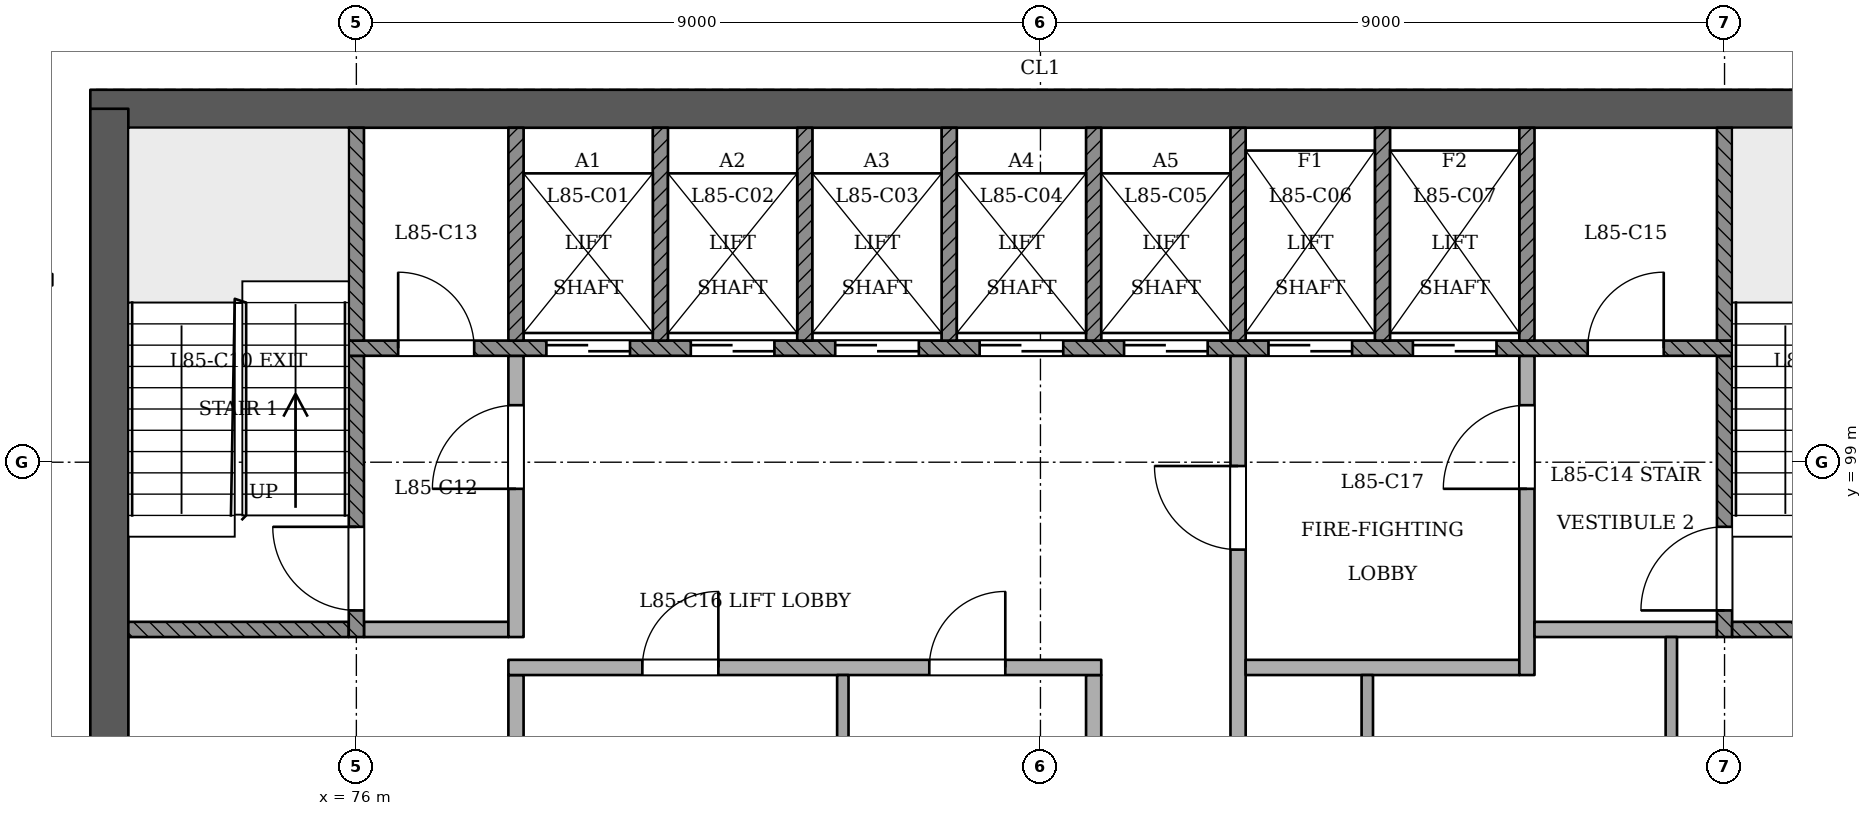
"""IFC4 building model, lengths in metres.
Left out: names, types, materials, properties, quantities, classifications, styles, units other than length and angle.
Written with IfcOpenShell. Run it as: python <this file> out.ifc"""

import sys

from ifc_helpers import new_model, si_unit, direction, frame, frame_2d, origin, place, context, subcontext, project, spatial, rectangle, extrude, element, fill, save


model = new_model("IFC4")
c1 = context("Model", 3, precision=1e-05, world=origin(), true_north=direction((0.0, 1.0)))
c2 = subcontext(c1, "Body", "Model", "MODEL_VIEW")
j1 = project(units=[si_unit("LENGTHUNIT", "METRE"), si_unit("PLANEANGLEUNIT", "RADIAN")], contexts=[c1])
p1 = place(None, origin())
s1 = spatial("IfcSite", under=j1, at=p1, CompositionType="ELEMENT")
p2 = place(p1, origin())
s2 = spatial("IfcBuilding", under=s1, at=p2, CompositionType="ELEMENT")
p3 = place(p2, frame((0.0, 0.0, 327.4)))
s3 = spatial("IfcBuildingStorey", under=s2, at=p3, CompositionType="ELEMENT", Elevation=327.4)
p4 = place(p3, frame((97.25, 103.65, 0.0), z_axis=(0.0, 0.0, 1.0), x_axis=(-1.0, 0.0, 0.0)))
e1 = element("IfcWall", 1, at=p4, inside=s3, PredefinedType="SHEAR", context=c2, shape_type="SweptSolid", body=[
    extrude(rectangle(XDim=24.75, YDim=0.5, at=frame_2d((12.375, 0.0))), origin(), (0.0, 0.0, 1.0), 3.6),
])
p5 = place(p3, frame((72.75, 103.65, 0.0), z_axis=(0.0, 0.0, 1.0), x_axis=(0.0, -1.0, 0.0)))
e2 = element("IfcWall", 2, at=p5, inside=s3, PredefinedType="SHEAR", context=c2, shape_type="SweptSolid", body=[
    extrude(rectangle(XDim=10.75, YDim=0.5, at=frame_2d((5.375, 0.0))), origin(), (0.0, 0.0, 1.0), 3.6),
])
p6 = place(p3, frame((78.1, 93.4, 0.0), z_axis=(0.0, 0.0, 1.0), x_axis=(0.0, 1.0, 0.0)))
e3 = element("IfcWall", 3, at=p6, inside=s3, PredefinedType="PARTITIONING", context=c2, shape_type="SweptSolid", body=[
    extrude(rectangle(XDim=2.8, YDim=0.2, at=frame_2d((1.4, 0.0))), origin(), (0.0, 0.0, 1.0), 3.2),
])
p7 = place(p3, frame((82.4, 93.4, 0.0), z_axis=(0.0, 0.0, 1.0), x_axis=(0.0, 1.0, 0.0)))
e4 = element("IfcWall", 4, at=p7, inside=s3, PredefinedType="PARTITIONING", context=c2, shape_type="SweptSolid", body=[
    extrude(rectangle(XDim=2.8, YDim=0.15, at=frame_2d((1.4, 0.0))), origin(), (0.0, 0.0, 1.0), 3.2),
])
p8 = place(p3, frame((85.7, 93.4, 0.0), z_axis=(0.0, 0.0, 1.0), x_axis=(0.0, 1.0, 0.0)))
e5 = element("IfcWall", 5, at=p8, inside=s3, PredefinedType="PARTITIONING", context=c2, shape_type="SweptSolid", body=[
    extrude(rectangle(XDim=2.8, YDim=0.2, at=frame_2d((1.4, 0.0))), origin(), (0.0, 0.0, 1.0), 3.2),
])
p9 = place(p3, frame((87.6, 93.4, 0.0), z_axis=(0.0, 0.0, 1.0), x_axis=(0.0, 1.0, 0.0)))
e6 = element("IfcWall", 6, at=p9, inside=s3, PredefinedType="PARTITIONING", context=c2, shape_type="SweptSolid", body=[
    extrude(rectangle(XDim=7.0, YDim=0.2, at=frame_2d((3.5, 0.0))), origin(), (0.0, 0.0, 1.0), 3.2),
])
p10 = place(p9, frame((4.45, 0.0, 0.0)))
e7 = element("IfcOpeningElement", 7, at=p10, cuts=e6, PredefinedType="OPENING", context=c2, shape_type="SweptSolid", body=[
    extrude(rectangle(XDim=1.1, YDim=2.1, at=frame_2d((0.55, 1.05))), frame((0.0, 0.11, 0.0), z_axis=(0.0, -1.0, 0.0), x_axis=(1.0, 0.0, 0.0)), (0.0, 0.0, 1.0), 0.221),
])
p11 = place(p3, frame((89.3, 93.4, 0.0), z_axis=(0.0, 0.0, 1.0), x_axis=(0.0, 1.0, 0.0)))
e8 = element("IfcWall", 8, at=p11, inside=s3, PredefinedType="PARTITIONING", context=c2, shape_type="SweptSolid", body=[
    extrude(rectangle(XDim=2.8, YDim=0.15, at=frame_2d((1.4, 0.0))), origin(), (0.0, 0.0, 1.0), 3.2),
])
p12 = place(p3, frame((93.3, 93.4, 0.0), z_axis=(0.0, 0.0, 1.0), x_axis=(0.0, 1.0, 0.0)))
e9 = element("IfcWall", 9, at=p12, inside=s3, PredefinedType="PARTITIONING", context=c2, shape_type="SweptSolid", body=[
    extrude(rectangle(XDim=3.3, YDim=0.15, at=frame_2d((1.65, 0.0))), origin(), (0.0, 0.0, 1.0), 3.2),
])
p13 = place(p3, frame((78.0, 96.3, 0.0), z_axis=(0.0, 0.0, 1.0), x_axis=(1.0, 0.0, 0.0)))
e10 = element("IfcWall", 10, at=p13, inside=s3, PredefinedType="PARTITIONING", context=c2, shape_type="SweptSolid", body=[
    extrude(rectangle(XDim=7.8, YDim=0.2, at=frame_2d((3.9, 0.0))), origin(), (0.0, 0.0, 1.0), 3.2),
])
p14 = place(p13, frame((1.762, 0.0, 0.0)))
e11 = element("IfcOpeningElement", 11, at=p14, cuts=e10, PredefinedType="OPENING", context=c2, shape_type="SweptSolid", body=[
    extrude(rectangle(XDim=1.0, YDim=2.1, at=frame_2d((0.5, 1.05))), frame((0.0, 0.11, 0.0), z_axis=(0.0, -1.0, 0.0), x_axis=(1.0, 0.0, 0.0)), (0.0, 0.0, 1.0), 0.221),
])
p15 = place(p13, frame((5.538, 0.0, 0.0)))
e12 = element("IfcOpeningElement", 12, at=p15, cuts=e10, PredefinedType="OPENING", context=c2, shape_type="SweptSolid", body=[
    extrude(rectangle(XDim=1.0, YDim=2.1, at=frame_2d((0.5, 1.05))), frame((0.0, 0.11, 0.0), z_axis=(0.0, -1.0, 0.0), x_axis=(1.0, 0.0, 0.0)), (0.0, 0.0, 1.0), 0.221),
])
p16 = place(p3, frame((87.7, 96.3, 0.0), z_axis=(0.0, 0.0, 1.0), x_axis=(1.0, 0.0, 0.0)))
e13 = element("IfcWall", 13, at=p16, inside=s3, PredefinedType="PARTITIONING", context=c2, shape_type="SweptSolid", body=[
    extrude(rectangle(XDim=3.6, YDim=0.2, at=frame_2d((1.8, 0.0))), origin(), (0.0, 0.0, 1.0), 3.2),
])
p17 = place(p3, frame((91.4, 96.2, 0.0), z_axis=(0.0, 0.0, 1.0), x_axis=(0.0, 1.0, 0.0)))
e14 = element("IfcWall", 14, at=p17, inside=s3, PredefinedType="PARTITIONING", context=c2, shape_type="SweptSolid", body=[
    extrude(rectangle(XDim=4.2, YDim=0.2, at=frame_2d((2.1, 0.0))), origin(), (0.0, 0.0, 1.0), 3.2),
])
p18 = place(p17, frame((2.45, 0.0, 0.0)))
e15 = element("IfcOpeningElement", 15, at=p18, cuts=e14, PredefinedType="OPENING", context=c2, shape_type="SweptSolid", body=[
    extrude(rectangle(XDim=1.1, YDim=2.1, at=frame_2d((0.55, 1.05))), frame((0.0, 0.11, 0.0), z_axis=(0.0, -1.0, 0.0), x_axis=(1.0, 0.0, 0.0)), (0.0, 0.0, 1.0), 0.221),
])
p19 = place(p3, frame((73.0, 96.8, 0.0), z_axis=(0.0, 0.0, 1.0), x_axis=(1.0, 0.0, 0.0)))
e16 = element("IfcWall", 16, at=p19, inside=s3, PredefinedType="SOLIDWALL", context=c2, shape_type="SweptSolid", body=[
    extrude(rectangle(XDim=2.9, YDim=0.2, at=frame_2d((1.45, 0.0))), origin(), (0.0, 0.0, 1.0), 3.2),
])
p20 = place(p3, frame((76.0, 96.7, 0.0), z_axis=(0.0, 0.0, 1.0), x_axis=(0.0, 1.0, 0.0)))
e17 = element("IfcWall", 17, at=p20, inside=s3, PredefinedType="SOLIDWALL", context=c2, shape_type="SweptSolid", body=[
    extrude(rectangle(XDim=3.7, YDim=0.2, at=frame_2d((1.85, 0.0))), origin(), (0.0, 0.0, 1.0), 3.2),
])
p21 = place(p20, frame((0.35, 0.0, 0.0)))
e18 = element("IfcOpeningElement", 18, at=p21, cuts=e17, PredefinedType="OPENING", context=c2, shape_type="SweptSolid", body=[
    extrude(rectangle(XDim=1.1, YDim=2.1, at=frame_2d((0.55, 1.05))), frame((0.0, 0.11, 0.0), z_axis=(0.0, -1.0, 0.0), x_axis=(1.0, 0.0, 0.0)), (0.0, 0.0, 1.0), 0.221),
])
p22 = place(p3, frame((76.1, 96.8, 0.0), z_axis=(0.0, 0.0, 1.0), x_axis=(1.0, 0.0, 0.0)))
e19 = element("IfcWall", 19, at=p22, inside=s3, PredefinedType="PARTITIONING", context=c2, shape_type="SweptSolid", body=[
    extrude(rectangle(XDim=1.9, YDim=0.2, at=frame_2d((0.95, 0.0))), origin(), (0.0, 0.0, 1.0), 3.2),
])
p23 = place(p3, frame((78.1, 96.7, 0.0), z_axis=(0.0, 0.0, 1.0), x_axis=(0.0, 1.0, 0.0)))
e20 = element("IfcWall", 20, at=p23, inside=s3, PredefinedType="PARTITIONING", context=c2, shape_type="SweptSolid", body=[
    extrude(rectangle(XDim=3.7, YDim=0.2, at=frame_2d((1.85, 0.0))), origin(), (0.0, 0.0, 1.0), 3.2),
])
p24 = place(p23, frame((1.95, 0.0, 0.0)))
e21 = element("IfcOpeningElement", 21, at=p24, cuts=e20, PredefinedType="OPENING", context=c2, shape_type="SweptSolid", body=[
    extrude(rectangle(XDim=1.1, YDim=2.1, at=frame_2d((0.55, 1.05))), frame((0.0, 0.11, 0.0), z_axis=(0.0, -1.0, 0.0), x_axis=(1.0, 0.0, 0.0)), (0.0, 0.0, 1.0), 0.221),
])
p25 = place(p3, frame((91.5, 96.8, 0.0), z_axis=(0.0, 0.0, 1.0), x_axis=(1.0, 0.0, 0.0)))
e22 = element("IfcWall", 22, at=p25, inside=s3, PredefinedType="PARTITIONING", context=c2, shape_type="SweptSolid", body=[
    extrude(rectangle(XDim=2.4, YDim=0.2, at=frame_2d((1.2, 0.0))), origin(), (0.0, 0.0, 1.0), 3.2),
])
p26 = place(p3, frame((94.0, 96.7, 0.0), z_axis=(0.0, 0.0, 1.0), x_axis=(0.0, 1.0, 0.0)))
e23 = element("IfcWall", 23, at=p26, inside=s3, PredefinedType="SOLIDWALL", context=c2, shape_type="SweptSolid", body=[
    extrude(rectangle(XDim=3.7, YDim=0.2, at=frame_2d((1.85, 0.0))), origin(), (0.0, 0.0, 1.0), 3.2),
])
p27 = place(p26, frame((0.35, 0.0, 0.0)))
e24 = element("IfcOpeningElement", 24, at=p27, cuts=e23, PredefinedType="OPENING", context=c2, shape_type="SweptSolid", body=[
    extrude(rectangle(XDim=1.1, YDim=2.1, at=frame_2d((0.55, 1.05))), frame((0.0, 0.11, 0.0), z_axis=(0.0, -1.0, 0.0), x_axis=(1.0, 0.0, 0.0)), (0.0, 0.0, 1.0), 0.221),
])
p28 = place(p3, frame((94.1, 96.8, 0.0), z_axis=(0.0, 0.0, 1.0), x_axis=(1.0, 0.0, 0.0)))
e25 = element("IfcWall", 25, at=p28, inside=s3, PredefinedType="SOLIDWALL", context=c2, shape_type="SweptSolid", body=[
    extrude(rectangle(XDim=2.9, YDim=0.2, at=frame_2d((1.45, 0.0))), origin(), (0.0, 0.0, 1.0), 3.2),
])
p29 = place(p3, frame((75.9, 100.5, 0.0), z_axis=(0.0, 0.0, 1.0), x_axis=(1.0, 0.0, 0.0)))
e26 = element("IfcWall", 26, at=p29, inside=s3, PredefinedType="SOLIDWALL", context=c2, shape_type="SweptSolid", body=[
    extrude(rectangle(XDim=18.2, YDim=0.2, at=frame_2d((9.1, 0.0))), origin(), (0.0, 0.0, 1.0), 3.2),
])
p30 = place(p29, frame((2.6, 0.0, 0.0)))
e27 = element("IfcOpeningElement", 27, at=p30, cuts=e26, PredefinedType="OPENING", context=c2, shape_type="SweptSolid", body=[
    extrude(rectangle(XDim=1.1, YDim=2.1, at=frame_2d((0.55, 1.05))), frame((0.0, 0.11, 0.0), z_axis=(0.0, -1.0, 0.0), x_axis=(1.0, 0.0, 0.0)), (0.0, 0.0, 1.0), 0.221),
])
p31 = place(p29, frame((4.5, 0.0, 0.0)))
e28 = element("IfcOpeningElement", 28, at=p31, cuts=e26, PredefinedType="OPENING", context=c2, shape_type="SweptSolid", body=[
    extrude(rectangle(XDim=1.1, YDim=2.1, at=frame_2d((0.55, 1.05))), frame((0.0, 0.11, 0.0), z_axis=(0.0, -1.0, 0.0), x_axis=(1.0, 0.0, 0.0)), (0.0, 0.0, 1.0), 0.221),
])
p32 = place(p29, frame((6.4, 0.0, 0.0)))
e29 = element("IfcOpeningElement", 29, at=p32, cuts=e26, PredefinedType="OPENING", context=c2, shape_type="SweptSolid", body=[
    extrude(rectangle(XDim=1.1, YDim=2.1, at=frame_2d((0.55, 1.05))), frame((0.0, 0.11, 0.0), z_axis=(0.0, -1.0, 0.0), x_axis=(1.0, 0.0, 0.0)), (0.0, 0.0, 1.0), 0.221),
])
p33 = place(p29, frame((8.3, 0.0, 0.0)))
e30 = element("IfcOpeningElement", 30, at=p33, cuts=e26, PredefinedType="OPENING", context=c2, shape_type="SweptSolid", body=[
    extrude(rectangle(XDim=1.1, YDim=2.1, at=frame_2d((0.55, 1.05))), frame((0.0, 0.11, 0.0), z_axis=(0.0, -1.0, 0.0), x_axis=(1.0, 0.0, 0.0)), (0.0, 0.0, 1.0), 0.221),
])
p34 = place(p29, frame((10.2, 0.0, 0.0)))
e31 = element("IfcOpeningElement", 31, at=p34, cuts=e26, PredefinedType="OPENING", context=c2, shape_type="SweptSolid", body=[
    extrude(rectangle(XDim=1.1, YDim=2.1, at=frame_2d((0.55, 1.05))), frame((0.0, 0.11, 0.0), z_axis=(0.0, -1.0, 0.0), x_axis=(1.0, 0.0, 0.0)), (0.0, 0.0, 1.0), 0.221),
])
p35 = place(p29, frame((12.1, 0.0, 0.0)))
e32 = element("IfcOpeningElement", 32, at=p35, cuts=e26, PredefinedType="OPENING", context=c2, shape_type="SweptSolid", body=[
    extrude(rectangle(XDim=1.1, YDim=2.1, at=frame_2d((0.55, 1.05))), frame((0.0, 0.11, 0.0), z_axis=(0.0, -1.0, 0.0), x_axis=(1.0, 0.0, 0.0)), (0.0, 0.0, 1.0), 0.221),
])
p36 = place(p29, frame((14.0, 0.0, 0.0)))
e33 = element("IfcOpeningElement", 33, at=p36, cuts=e26, PredefinedType="OPENING", context=c2, shape_type="SweptSolid", body=[
    extrude(rectangle(XDim=1.1, YDim=2.1, at=frame_2d((0.55, 1.05))), frame((0.0, 0.11, 0.0), z_axis=(0.0, -1.0, 0.0), x_axis=(1.0, 0.0, 0.0)), (0.0, 0.0, 1.0), 0.221),
])
p37 = place(p29, frame((0.65, 0.0, 0.0)))
e34 = element("IfcOpeningElement", 34, at=p37, cuts=e26, PredefinedType="OPENING", context=c2, shape_type="SweptSolid", body=[
    extrude(rectangle(XDim=1.0, YDim=2.1, at=frame_2d((0.5, 1.05))), frame((0.0, 0.11, 0.0), z_axis=(0.0, -1.0, 0.0), x_axis=(1.0, 0.0, 0.0)), (0.0, 0.0, 1.0), 0.221),
])
p38 = place(p29, frame((16.3, 0.0, 0.0)))
e35 = element("IfcOpeningElement", 35, at=p38, cuts=e26, PredefinedType="OPENING", context=c2, shape_type="SweptSolid", body=[
    extrude(rectangle(XDim=1.0, YDim=2.1, at=frame_2d((0.5, 1.05))), frame((0.0, 0.11, 0.0), z_axis=(0.0, -1.0, 0.0), x_axis=(1.0, 0.0, 0.0)), (0.0, 0.0, 1.0), 0.221),
])
for number, where, z_axis, x_axis in (
    (36, (76.0, 100.6, 0.0), (0.0, 0.0, 1.0), (0.0, 1.0, 0.0)),
    (37, (78.1, 100.6, 0.0), (0.0, 0.0, 1.0), (0.0, 1.0, 0.0)),
    (38, (80.0, 100.6, 0.0), (0.0, 0.0, 1.0), (0.0, 1.0, 0.0)),
    (39, (81.9, 100.6, 0.0), (0.0, 0.0, 1.0), (0.0, 1.0, 0.0)),
    (40, (83.8, 100.6, 0.0), (0.0, 0.0, 1.0), (0.0, 1.0, 0.0)),
    (41, (85.7, 100.6, 0.0), (0.0, 0.0, 1.0), (0.0, 1.0, 0.0)),
    (42, (87.6, 100.6, 0.0), (0.0, 0.0, 1.0), (0.0, 1.0, 0.0)),
    (43, (89.5, 100.6, 0.0), (0.0, 0.0, 1.0), (0.0, 1.0, 0.0)),
    (44, (91.4, 100.6, 0.0), (0.0, 0.0, 1.0), (0.0, 1.0, 0.0)),
    (45, (94.0, 100.6, 0.0), (0.0, 0.0, 1.0), (0.0, 1.0, 0.0)),
):
    element("IfcWall", number, at=place(p3, frame(where, z_axis=z_axis, x_axis=x_axis)), inside=s3, PredefinedType="SOLIDWALL", context=c2, shape_type="SweptSolid", body=[
        extrude(rectangle(XDim=2.8, YDim=0.2, at=frame_2d((1.4, 0.0))), origin(), (0.0, 0.0, 1.0), 3.2),
    ])
p39 = place(p30, origin())
e46 = element("IfcDoor", 46, at=p39, inside=s3, OperationType="SLIDING_TO_RIGHT", PredefinedType="NOTDEFINED", context=c2, shape_type="SweptSolid", body=[
    extrude(rectangle(XDim=1.1, YDim=2.1, at=frame_2d((0.55, 1.05))), frame((0.0, 0.025, 0.0), z_axis=(0.0, -1.0, 0.0), x_axis=(1.0, 0.0, 0.0)), (0.0, 0.0, 1.0), 0.05),
])
fill(e27, e46)
p40 = place(p31, origin())
e47 = element("IfcDoor", 47, at=p40, inside=s3, OperationType="SLIDING_TO_LEFT", PredefinedType="NOTDEFINED", context=c2, shape_type="SweptSolid", body=[
    extrude(rectangle(XDim=1.1, YDim=2.1, at=frame_2d((0.55, 1.05))), frame((0.0, 0.025, 0.0), z_axis=(0.0, -1.0, 0.0), x_axis=(1.0, 0.0, 0.0)), (0.0, 0.0, 1.0), 0.05),
])
fill(e28, e47)
p41 = place(p32, origin())
e48 = element("IfcDoor", 48, at=p41, inside=s3, OperationType="SLIDING_TO_RIGHT", PredefinedType="NOTDEFINED", context=c2, shape_type="SweptSolid", body=[
    extrude(rectangle(XDim=1.1, YDim=2.1, at=frame_2d((0.55, 1.05))), frame((0.0, 0.025, 0.0), z_axis=(0.0, -1.0, 0.0), x_axis=(1.0, 0.0, 0.0)), (0.0, 0.0, 1.0), 0.05),
])
fill(e29, e48)
p42 = place(p33, origin())
e49 = element("IfcDoor", 49, at=p42, inside=s3, OperationType="SLIDING_TO_LEFT", PredefinedType="NOTDEFINED", context=c2, shape_type="SweptSolid", body=[
    extrude(rectangle(XDim=1.1, YDim=2.1, at=frame_2d((0.55, 1.05))), frame((0.0, 0.025, 0.0), z_axis=(0.0, -1.0, 0.0), x_axis=(1.0, 0.0, 0.0)), (0.0, 0.0, 1.0), 0.05),
])
fill(e30, e49)
p43 = place(p34, origin())
e50 = element("IfcDoor", 50, at=p43, inside=s3, OperationType="SLIDING_TO_RIGHT", PredefinedType="NOTDEFINED", context=c2, shape_type="SweptSolid", body=[
    extrude(rectangle(XDim=1.1, YDim=2.1, at=frame_2d((0.55, 1.05))), frame((0.0, 0.025, 0.0), z_axis=(0.0, -1.0, 0.0), x_axis=(1.0, 0.0, 0.0)), (0.0, 0.0, 1.0), 0.05),
])
fill(e31, e50)
p44 = place(p35, origin())
e51 = element("IfcDoor", 51, at=p44, inside=s3, OperationType="SLIDING_TO_RIGHT", PredefinedType="NOTDEFINED", context=c2, shape_type="SweptSolid", body=[
    extrude(rectangle(XDim=1.1, YDim=2.1, at=frame_2d((0.55, 1.05))), frame((0.0, 0.025, 0.0), z_axis=(0.0, -1.0, 0.0), x_axis=(1.0, 0.0, 0.0)), (0.0, 0.0, 1.0), 0.05),
])
fill(e32, e51)
p45 = place(p36, origin())
e52 = element("IfcDoor", 52, at=p45, inside=s3, OperationType="SLIDING_TO_LEFT", PredefinedType="NOTDEFINED", context=c2, shape_type="SweptSolid", body=[
    extrude(rectangle(XDim=1.1, YDim=2.1, at=frame_2d((0.55, 1.05))), frame((0.0, 0.025, 0.0), z_axis=(0.0, -1.0, 0.0), x_axis=(1.0, 0.0, 0.0)), (0.0, 0.0, 1.0), 0.05),
])
fill(e33, e52)
p46 = place(p21, origin())
e53 = element("IfcDoor", 53, at=p46, inside=s3, OperationType="SINGLE_SWING_RIGHT", PredefinedType="NOTDEFINED", context=c2, shape_type="SweptSolid", body=[
    extrude(rectangle(XDim=1.1, YDim=2.1, at=frame_2d((0.55, 1.05))), frame((0.0, 0.025, 0.0), z_axis=(0.0, -1.0, 0.0), x_axis=(1.0, 0.0, 0.0)), (0.0, 0.0, 1.0), 0.05),
])
fill(e18, e53)
p47 = place(p27, origin())
e54 = element("IfcDoor", 54, at=p47, inside=s3, OperationType="SINGLE_SWING_LEFT", PredefinedType="NOTDEFINED", context=c2, shape_type="SweptSolid", body=[
    extrude(rectangle(XDim=1.1, YDim=2.1, at=frame_2d((0.55, 1.05))), frame((0.0, 0.025, 0.0), z_axis=(0.0, -1.0, 0.0), x_axis=(1.0, 0.0, 0.0)), (0.0, 0.0, 1.0), 0.05),
])
fill(e24, e54)
p48 = place(p24, origin())
e55 = element("IfcDoor", 55, at=p48, inside=s3, OperationType="SINGLE_SWING_LEFT", PredefinedType="NOTDEFINED", context=c2, shape_type="SweptSolid", body=[
    extrude(rectangle(XDim=1.1, YDim=2.1, at=frame_2d((0.55, 1.05))), frame((0.0, 0.025, 0.0), z_axis=(0.0, -1.0, 0.0), x_axis=(1.0, 0.0, 0.0)), (0.0, 0.0, 1.0), 0.05),
])
fill(e21, e55)
p49 = place(p10, origin())
e56 = element("IfcDoor", 56, at=p49, inside=s3, OperationType="SINGLE_SWING_RIGHT", PredefinedType="NOTDEFINED", context=c2, shape_type="SweptSolid", body=[
    extrude(rectangle(XDim=1.1, YDim=2.1, at=frame_2d((0.55, 1.05))), frame((0.0, 0.025, 0.0), z_axis=(0.0, -1.0, 0.0), x_axis=(1.0, 0.0, 0.0)), (0.0, 0.0, 1.0), 0.05),
])
fill(e7, e56)
p50 = place(p18, origin())
e57 = element("IfcDoor", 57, at=p50, inside=s3, OperationType="SINGLE_SWING_LEFT", PredefinedType="NOTDEFINED", context=c2, shape_type="SweptSolid", body=[
    extrude(rectangle(XDim=1.1, YDim=2.1, at=frame_2d((0.55, 1.05))), frame((0.0, 0.025, 0.0), z_axis=(0.0, -1.0, 0.0), x_axis=(1.0, 0.0, 0.0)), (0.0, 0.0, 1.0), 0.05),
])
fill(e15, e57)
p51 = place(p37, origin())
e58 = element("IfcDoor", 58, at=p51, inside=s3, OperationType="SINGLE_SWING_LEFT", PredefinedType="NOTDEFINED", context=c2, shape_type="SweptSolid", body=[
    extrude(rectangle(XDim=1.0, YDim=2.1, at=frame_2d((0.5, 1.05))), frame((0.0, 0.025, 0.0), z_axis=(0.0, -1.0, 0.0), x_axis=(1.0, 0.0, 0.0)), (0.0, 0.0, 1.0), 0.05),
])
fill(e34, e58)
p52 = place(p38, origin())
e59 = element("IfcDoor", 59, at=p52, inside=s3, OperationType="SINGLE_SWING_RIGHT", PredefinedType="NOTDEFINED", context=c2, shape_type="SweptSolid", body=[
    extrude(rectangle(XDim=1.0, YDim=2.1, at=frame_2d((0.5, 1.05))), frame((0.0, 0.025, 0.0), z_axis=(0.0, -1.0, 0.0), x_axis=(1.0, 0.0, 0.0)), (0.0, 0.0, 1.0), 0.05),
])
fill(e35, e59)
p53 = place(p14, origin())
e60 = element("IfcDoor", 60, at=p53, inside=s3, OperationType="SINGLE_SWING_RIGHT", PredefinedType="NOTDEFINED", context=c2, shape_type="SweptSolid", body=[
    extrude(rectangle(XDim=1.0, YDim=2.1, at=frame_2d((0.5, 1.05))), frame((0.0, 0.025, 0.0), z_axis=(0.0, -1.0, 0.0), x_axis=(1.0, 0.0, 0.0)), (0.0, 0.0, 1.0), 0.05),
])
fill(e11, e60)
p54 = place(p15, origin())
e61 = element("IfcDoor", 61, at=p54, inside=s3, OperationType="SINGLE_SWING_RIGHT", PredefinedType="NOTDEFINED", context=c2, shape_type="SweptSolid", body=[
    extrude(rectangle(XDim=1.0, YDim=2.1, at=frame_2d((0.5, 1.05))), frame((0.0, 0.025, 0.0), z_axis=(0.0, -1.0, 0.0), x_axis=(1.0, 0.0, 0.0)), (0.0, 0.0, 1.0), 0.05),
])
fill(e12, e61)
save(model, sys.argv[1])
